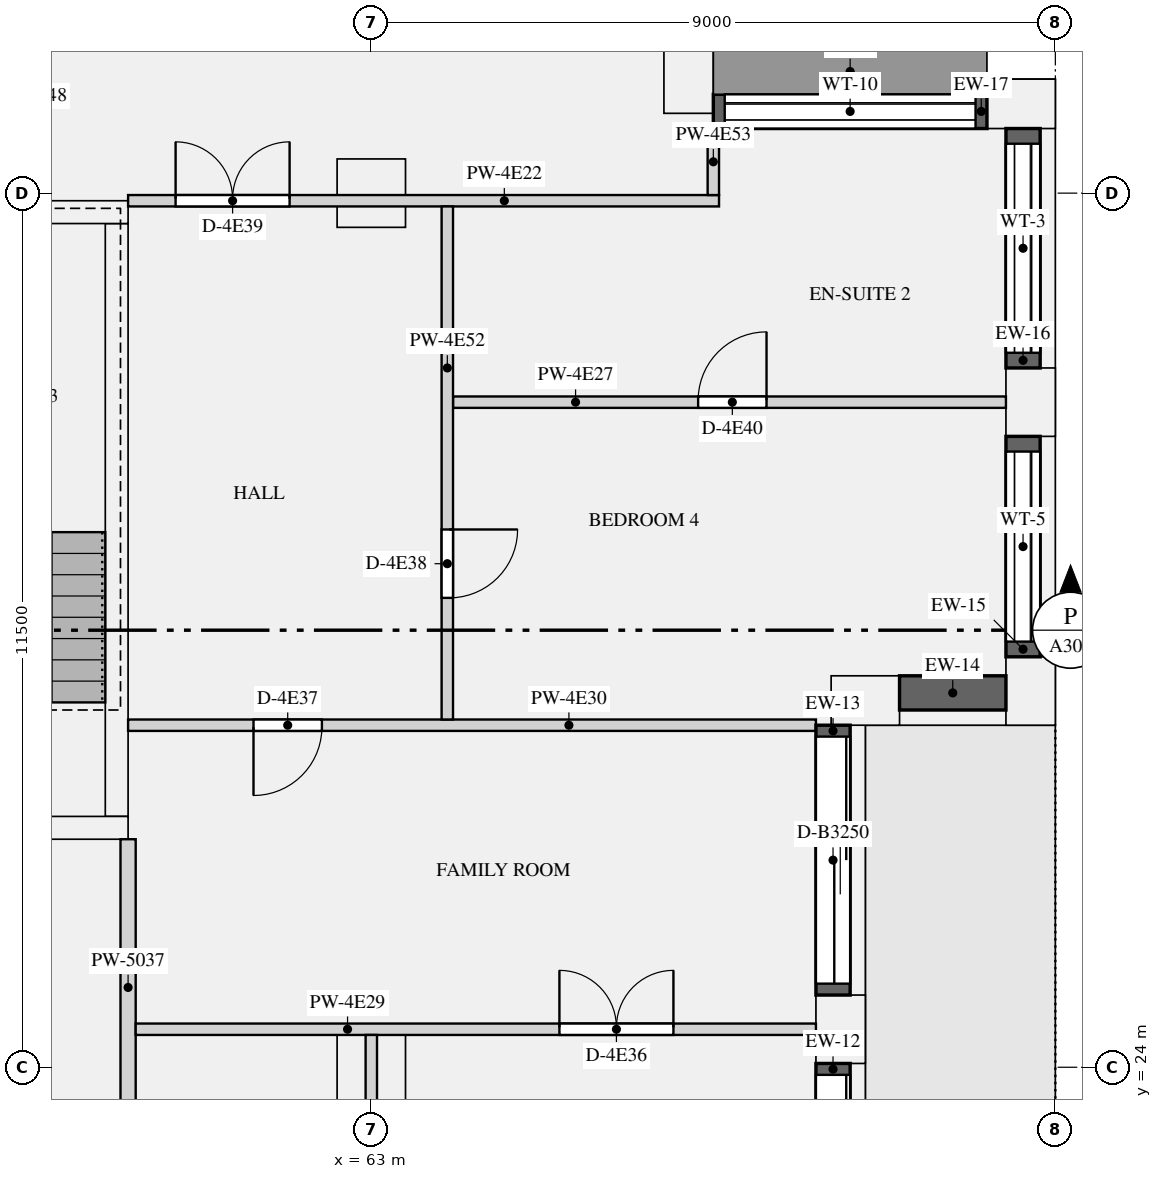
"""IFC4 building model, lengths in metres.
Left out: names, types, materials, properties, quantities, classifications, styles, units other than length and angle.
Written with IfcOpenShell. Run it as: python <this file> out.ifc"""

import sys

from ifc_helpers import new_model, si_unit, direction, frame, frame_2d, origin, origin_2d, place, context, subcontext, project, spatial, rectangle, extrude, element, fill, save


model = new_model("IFC4")
c1 = context("Model", 3, precision=1e-05, world=origin(), true_north=direction((0.0, 1.0)))
c2 = subcontext(c1, "Body", "Model", "MODEL_VIEW")
j1 = project(units=[si_unit("LENGTHUNIT", "METRE"), si_unit("PLANEANGLEUNIT", "RADIAN")], contexts=[c1])
p1 = place(None, origin())
s1 = spatial("IfcSite", under=j1, at=p1, CompositionType="ELEMENT")
p2 = place(p1, origin())
s2 = spatial("IfcBuilding", under=s1, at=p2, CompositionType="ELEMENT")
p3 = place(p2, frame((0.0, 0.0, 232.65)))
s3 = spatial("IfcBuildingStorey", under=s2, at=p3, CompositionType="ELEMENT", Elevation=232.65)
for number, where, z_axis, x_axis in (
    (1, (69.175, 24.5, 0.0), (0.0, 0.0, 1.0), (0.0, 1.0, 0.0)),
    (2, (69.5, 28.825, 0.0), (0.0, 0.0, 1.0), (1.0, 0.0, 0.0)),
    (3, (71.675, 28.95, 0.0), (0.0, 0.0, 1.0), (0.0, 1.0, 0.0)),
    (4, (71.675, 32.75, 0.0), (0.0, 0.0, 1.0), (0.0, 1.0, 0.0)),
    (5, (71.55, 36.675, 0.0), (0.0, 0.0, 1.0), (-1.0, 0.0, 0.0)),
    (6, (67.175, 37.0, 0.0), (0.0, 0.0, 1.0), (0.0, 1.0, 0.0)),
):
    element("IfcColumn", number, at=place(p3, frame(where, z_axis=z_axis, x_axis=x_axis)), inside=s3, PredefinedType="USERDEFINED", context=c2, shape_type="SweptSolid", body=[
        extrude(rectangle(XDim=0.9, YDim=0.65, at=origin_2d()), origin(), (0.0, 0.0, 1.0), 3.15),
    ])
for number, where, z_axis, x_axis in (
    (7, (63.0, 24.0, 0.0), (0.0, 0.0, 1.0), (1.0, 0.0, 0.0)),
    (8, (63.0, 35.5, 0.0), (0.0, 0.0, 1.0), (1.0, 0.0, 0.0)),
):
    element("IfcColumn", number, at=place(p3, frame(where, z_axis=z_axis, x_axis=x_axis)), inside=s3, PredefinedType="COLUMN", context=c2, shape_type="SweptSolid", body=[
        extrude(rectangle(XDim=0.9, YDim=0.9, at=origin_2d()), origin(), (0.0, 0.0, 1.0), 3.15),
    ])
p4 = place(p3, frame((56.2, 27.15, 0.0), z_axis=(0.0, 0.0, 1.0), x_axis=(1.0, 0.0, 0.0)))
e9 = element("IfcWall", 9, at=p4, inside=s3, PredefinedType="SHEAR", context=c2, shape_type="SweptSolid", body=[
    extrude(rectangle(XDim=3.6, YDim=0.3, at=frame_2d((1.8, 0.0))), origin(), (0.0, 0.0, 1.0), 3.15),
])
p5 = place(p4, frame((1.25, 0.0, 0.0)))
e10 = element("IfcOpeningElement", 10, at=p5, cuts=e9, PredefinedType="OPENING", context=c2, shape_type="SweptSolid", body=[
    extrude(rectangle(XDim=1.1, YDim=2.1, at=frame_2d((0.55, 1.05))), frame((0.0, 0.16, 0.0), z_axis=(0.0, -1.0, 0.0), x_axis=(1.0, 0.0, 0.0)), (0.0, 0.0, 1.0), 0.32),
])
p6 = place(p3, frame((56.2, 35.25, 0.0), z_axis=(0.0, 0.0, 1.0), x_axis=(1.0, 0.0, 0.0)))
e11 = element("IfcWall", 11, at=p6, inside=s3, PredefinedType="SHEAR", context=c2, shape_type="SweptSolid", body=[
    extrude(rectangle(XDim=3.6, YDim=0.3, at=frame_2d((1.8, 0.0))), origin(), (0.0, 0.0, 1.0), 3.15),
])
p7 = place(p3, frame((59.65, 27.3, 0.0), z_axis=(0.0, 0.0, 1.0), x_axis=(0.0, 1.0, 0.0)))
e12 = element("IfcWall", 12, at=p7, inside=s3, PredefinedType="SHEAR", context=c2, shape_type="SweptSolid", body=[
    extrude(rectangle(XDim=7.8, YDim=0.3, at=frame_2d((3.9, 0.0))), origin(), (0.0, 0.0, 1.0), 3.15),
])
p8 = place(p3, frame((69.075, 20.95, 0.0), z_axis=(0.0, 0.0, 1.0), x_axis=(0.0, 1.0, 0.0)))
e13 = element("IfcWall", 13, at=p8, inside=s3, PredefinedType="SOLIDWALL", context=c2, shape_type="SweptSolid", body=[
    extrude(rectangle(XDim=3.1, YDim=0.45, at=frame_2d((1.55, 0.0))), origin(), (0.0, 0.0, 1.0), 2.8),
])
p9 = place(p8, frame((0.15, 0.0, 0.0)))
e14 = element("IfcOpeningElement", 14, at=p9, cuts=e13, PredefinedType="OPENING", context=c2, shape_type="SweptSolid", body=[
    extrude(rectangle(XDim=2.8, YDim=2.3, at=frame_2d((1.4, 1.15))), frame((0.0, 0.235, 0.0), z_axis=(0.0, -1.0, 0.0), x_axis=(1.0, 0.0, 0.0)), (0.0, 0.0, 1.0), 0.47),
])
p10 = place(p3, frame((69.075, 24.95, 0.0), z_axis=(0.0, 0.0, 1.0), x_axis=(0.0, 1.0, 0.0)))
e15 = element("IfcWall", 15, at=p10, inside=s3, PredefinedType="SOLIDWALL", context=c2, shape_type="SweptSolid", body=[
    extrude(rectangle(XDim=3.55, YDim=0.45, at=frame_2d((1.775, 0.0))), origin(), (0.0, 0.0, 1.0), 2.8),
])
p11 = place(p10, frame((0.15, 0.0, 0.0)))
e16 = element("IfcOpeningElement", 16, at=p11, cuts=e15, PredefinedType="OPENING", context=c2, shape_type="SweptSolid", body=[
    extrude(rectangle(XDim=3.25, YDim=2.3, at=frame_2d((1.625, 1.15))), frame((0.0, 0.235, 0.0), z_axis=(0.0, -1.0, 0.0), x_axis=(1.0, 0.0, 0.0)), (0.0, 0.0, 1.0), 0.47),
])
p12 = place(p3, frame((69.95, 28.925, 0.9), z_axis=(0.0, 0.0, 1.0), x_axis=(1.0, 0.0, 0.0)))
e17 = element("IfcWall", 17, at=p12, inside=s3, PredefinedType="SOLIDWALL", context=c2, shape_type="SweptSolid", body=[
    extrude(rectangle(XDim=1.4, YDim=0.45, at=frame_2d((0.7, 0.0))), origin(), (0.0, 0.0, 1.0), 1.9),
])
p13 = place(p3, frame((71.575, 29.4, 0.9), z_axis=(0.0, 0.0, 1.0), x_axis=(0.0, 1.0, 0.0)))
e18 = element("IfcWall", 18, at=p13, inside=s3, PredefinedType="SOLIDWALL", context=c2, shape_type="SweptSolid", body=[
    extrude(rectangle(XDim=2.9, YDim=0.45, at=frame_2d((1.45, 0.0))), origin(), (0.0, 0.0, 1.0), 1.9),
])
p14 = place(p13, frame((0.2, 0.0, 0.15)))
e19 = element("IfcOpeningElement", 19, at=p14, cuts=e18, PredefinedType="OPENING", context=c2, shape_type="SweptSolid", body=[
    extrude(rectangle(XDim=2.5, YDim=1.5, at=frame_2d((1.25, 0.75))), frame((0.0, 0.235, 0.0), z_axis=(0.0, -1.0, 0.0), x_axis=(1.0, 0.0, 0.0)), (0.0, 0.0, 1.0), 0.47),
])
p15 = place(p3, frame((71.575, 33.2, 0.9), z_axis=(0.0, 0.0, 1.0), x_axis=(0.0, 1.0, 0.0)))
e20 = element("IfcWall", 20, at=p15, inside=s3, PredefinedType="SOLIDWALL", context=c2, shape_type="SweptSolid", body=[
    extrude(rectangle(XDim=3.15, YDim=0.45, at=frame_2d((1.575, 0.0))), origin(), (0.0, 0.0, 1.0), 1.9),
])
p16 = place(p15, frame((0.2, 0.0, 0.15)))
e21 = element("IfcOpeningElement", 21, at=p16, cuts=e20, PredefinedType="OPENING", context=c2, shape_type="SweptSolid", body=[
    extrude(rectangle(XDim=2.75, YDim=1.5, at=frame_2d((1.375, 0.75))), frame((0.0, 0.235, 0.0), z_axis=(0.0, -1.0, 0.0), x_axis=(1.0, 0.0, 0.0)), (0.0, 0.0, 1.0), 0.47),
])
p17 = place(p3, frame((71.1, 36.575, 0.9), z_axis=(0.0, 0.0, 1.0), x_axis=(-1.0, 0.0, 0.0)))
e22 = element("IfcWall", 22, at=p17, inside=s3, PredefinedType="SOLIDWALL", context=c2, shape_type="SweptSolid", body=[
    extrude(rectangle(XDim=3.6, YDim=0.45, at=frame_2d((1.8, 0.0))), origin(), (0.0, 0.0, 1.0), 1.9),
])
p18 = place(p17, frame((0.15, 0.0, 0.15)))
e23 = element("IfcOpeningElement", 23, at=p18, cuts=e22, PredefinedType="OPENING", context=c2, shape_type="SweptSolid", body=[
    extrude(rectangle(XDim=3.3, YDim=1.5, at=frame_2d((1.65, 0.75))), frame((0.0, 0.235, 0.0), z_axis=(0.0, -1.0, 0.0), x_axis=(1.0, 0.0, 0.0)), (0.0, 0.0, 1.0), 0.47),
])
p19 = place(p3, frame((59.8, 23.1, 0.0), z_axis=(0.0, 0.0, 1.0), x_axis=(0.0, 1.0, 0.0)))
e24 = element("IfcWall", 24, at=p19, inside=s3, PredefinedType="PARTITIONING", context=c2, shape_type="SweptSolid", body=[
    extrude(rectangle(XDim=3.9, YDim=0.2, at=frame_2d((1.95, 0.0))), origin(), (0.0, 0.0, 1.0), 2.8),
])
p20 = place(p3, frame((59.8, 35.4, 0.0), z_axis=(0.0, 0.0, 1.0), x_axis=(1.0, 0.0, 0.0)))
e25 = element("IfcWall", 25, at=p20, inside=s3, PredefinedType="PARTITIONING", context=c2, shape_type="SweptSolid", body=[
    extrude(rectangle(XDim=7.775, YDim=0.15, at=frame_2d((3.887, 0.0))), origin(), (0.0, 0.0, 1.0), 2.8),
])
p21 = place(p20, frame((0.625, 0.0, 0.0)))
e26 = element("IfcOpeningElement", 26, at=p21, cuts=e25, PredefinedType="OPENING", context=c2, shape_type="SweptSolid", body=[
    extrude(rectangle(XDim=1.5, YDim=2.1, at=frame_2d((0.75, 1.05))), frame((0.0, 0.085, 0.0), z_axis=(0.0, -1.0, 0.0), x_axis=(1.0, 0.0, 0.0)), (0.0, 0.0, 1.0), 0.17),
])
p22 = place(p3, frame((64.075, 32.75, 0.0), z_axis=(0.0, 0.0, 1.0), x_axis=(1.0, 0.0, 0.0)))
e27 = element("IfcWall", 27, at=p22, inside=s3, PredefinedType="PARTITIONING", context=c2, shape_type="SweptSolid", body=[
    extrude(rectangle(XDim=7.275, YDim=0.15, at=frame_2d((3.638, 0.0))), origin(), (0.0, 0.0, 1.0), 2.8),
])
p23 = place(p22, frame((3.225, 0.0, 0.0)))
e28 = element("IfcOpeningElement", 28, at=p23, cuts=e27, PredefinedType="OPENING", context=c2, shape_type="SweptSolid", body=[
    extrude(rectangle(XDim=0.9, YDim=2.1, at=frame_2d((0.45, 1.05))), frame((0.0, 0.085, 0.0), z_axis=(0.0, -1.0, 0.0), x_axis=(1.0, 0.0, 0.0)), (0.0, 0.0, 1.0), 0.17),
])
p24 = place(p3, frame((59.9, 24.5, 0.0), z_axis=(0.0, 0.0, 1.0), x_axis=(1.0, 0.0, 0.0)))
e29 = element("IfcWall", 29, at=p24, inside=s3, PredefinedType="PARTITIONING", context=c2, shape_type="SweptSolid", body=[
    extrude(rectangle(XDim=8.95, YDim=0.15, at=frame_2d((4.475, 0.0))), origin(), (0.0, 0.0, 1.0), 2.8),
])
p25 = place(p24, frame((5.575, 0.0, 0.0)))
e30 = element("IfcOpeningElement", 30, at=p25, cuts=e29, PredefinedType="OPENING", context=c2, shape_type="SweptSolid", body=[
    extrude(rectangle(XDim=1.5, YDim=2.1, at=frame_2d((0.75, 1.05))), frame((0.0, 0.085, 0.0), z_axis=(0.0, -1.0, 0.0), x_axis=(1.0, 0.0, 0.0)), (0.0, 0.0, 1.0), 0.17),
])
p26 = place(p3, frame((59.8, 28.5, 0.0), z_axis=(0.0, 0.0, 1.0), x_axis=(1.0, 0.0, 0.0)))
e31 = element("IfcWall", 31, at=p26, inside=s3, PredefinedType="PARTITIONING", context=c2, shape_type="SweptSolid", body=[
    extrude(rectangle(XDim=9.05, YDim=0.15, at=frame_2d((4.525, 0.0))), origin(), (0.0, 0.0, 1.0), 2.8),
])
p27 = place(p26, frame((1.65, 0.0, 0.0)))
e32 = element("IfcOpeningElement", 32, at=p27, cuts=e31, PredefinedType="OPENING", context=c2, shape_type="SweptSolid", body=[
    extrude(rectangle(XDim=0.9, YDim=2.1, at=frame_2d((0.45, 1.05))), frame((0.0, 0.085, 0.0), z_axis=(0.0, -1.0, 0.0), x_axis=(1.0, 0.0, 0.0)), (0.0, 0.0, 1.0), 0.17),
])
p28 = place(p3, frame((63.0, 12.575, 0.0), z_axis=(0.0, 0.0, 1.0), x_axis=(0.0, 1.0, 0.0)))
e33 = element("IfcWall", 33, at=p28, inside=s3, PredefinedType="PARTITIONING", context=c2, shape_type="SweptSolid", body=[
    extrude(rectangle(XDim=11.85, YDim=0.15, at=frame_2d((5.925, 0.0))), origin(), (0.0, 0.0, 1.0), 2.8),
])
p29 = place(p28, frame((8.25, 0.0, 0.0)))
e34 = element("IfcOpeningElement", 34, at=p29, cuts=e33, PredefinedType="OPENING", context=c2, shape_type="SweptSolid", body=[
    extrude(rectangle(XDim=0.9, YDim=2.1, at=frame_2d((0.45, 1.05))), frame((0.0, 0.085, 0.0), z_axis=(0.0, -1.0, 0.0), x_axis=(1.0, 0.0, 0.0)), (0.0, 0.0, 1.0), 0.17),
])
p30 = place(p3, frame((64.0, 28.575, 0.0), z_axis=(0.0, 0.0, 1.0), x_axis=(0.0, 1.0, 0.0)))
e35 = element("IfcWall", 35, at=p30, inside=s3, PredefinedType="PARTITIONING", context=c2, shape_type="SweptSolid", body=[
    extrude(rectangle(XDim=6.75, YDim=0.15, at=frame_2d((3.375, 0.0))), origin(), (0.0, 0.0, 1.0), 2.8),
])
p31 = place(p30, frame((1.6, 0.0, 0.0)))
e36 = element("IfcOpeningElement", 36, at=p31, cuts=e35, PredefinedType="OPENING", context=c2, shape_type="SweptSolid", body=[
    extrude(rectangle(XDim=0.9, YDim=2.1, at=frame_2d((0.45, 1.05))), frame((0.0, 0.085, 0.0), z_axis=(0.0, -1.0, 0.0), x_axis=(1.0, 0.0, 0.0)), (0.0, 0.0, 1.0), 0.17),
])
p32 = place(p3, frame((67.5, 35.475, 0.0), z_axis=(0.0, 0.0, 1.0), x_axis=(0.0, 1.0, 0.0)))
e37 = element("IfcWall", 37, at=p32, inside=s3, PredefinedType="PARTITIONING", context=c2, shape_type="SweptSolid", body=[
    extrude(rectangle(XDim=0.875, YDim=0.15, at=frame_2d((0.438, 0.0))), origin(), (0.0, 0.0, 1.0), 2.8),
])
p33 = place(p9, origin())
e38 = element("IfcDoor", 38, at=p33, inside=s3, OperationType="SLIDING_TO_LEFT", PredefinedType="DOOR", context=c2, shape_type="SweptSolid", body=[
    extrude(rectangle(XDim=2.8, YDim=2.3, at=frame_2d((1.4, 1.15))), frame((0.0, -0.07, 0.0), z_axis=(0.0, -1.0, 0.0), x_axis=(1.0, 0.0, 0.0)), (0.0, 0.0, 1.0), 0.05),
])
fill(e14, e38)
p34 = place(p11, origin())
e39 = element("IfcDoor", 39, at=p34, inside=s3, OperationType="SLIDING_TO_LEFT", PredefinedType="DOOR", context=c2, shape_type="SweptSolid", body=[
    extrude(rectangle(XDim=3.25, YDim=2.3, at=frame_2d((1.625, 1.15))), frame((0.0, -0.07, 0.0), z_axis=(0.0, -1.0, 0.0), x_axis=(1.0, 0.0, 0.0)), (0.0, 0.0, 1.0), 0.05),
])
fill(e16, e39)
p35 = place(p14, origin())
e40 = element("IfcWindow", 40, at=p35, inside=s3, PartitioningType="SINGLE_PANEL", PredefinedType="WINDOW", context=c2, shape_type="SweptSolid", body=[
    extrude(rectangle(XDim=2.5, YDim=1.5, at=frame_2d((1.25, 0.75))), frame((0.0, -0.065, 0.0), z_axis=(0.0, -1.0, 0.0), x_axis=(1.0, 0.0, 0.0)), (0.0, 0.0, 1.0), 0.06),
])
fill(e19, e40)
p36 = place(p16, origin())
e41 = element("IfcWindow", 41, at=p36, inside=s3, PartitioningType="SINGLE_PANEL", PredefinedType="WINDOW", context=c2, shape_type="SweptSolid", body=[
    extrude(rectangle(XDim=2.75, YDim=1.5, at=frame_2d((1.375, 0.75))), frame((0.0, -0.065, 0.0), z_axis=(0.0, -1.0, 0.0), x_axis=(1.0, 0.0, 0.0)), (0.0, 0.0, 1.0), 0.06),
])
fill(e21, e41)
p37 = place(p18, origin())
e42 = element("IfcWindow", 42, at=p37, inside=s3, PartitioningType="SINGLE_PANEL", PredefinedType="WINDOW", context=c2, shape_type="SweptSolid", body=[
    extrude(rectangle(XDim=3.3, YDim=1.5, at=frame_2d((1.65, 0.75))), frame((0.0, -0.065, 0.0), z_axis=(0.0, -1.0, 0.0), x_axis=(1.0, 0.0, 0.0)), (0.0, 0.0, 1.0), 0.06),
])
fill(e23, e42)
p38 = place(p25, origin())
e43 = element("IfcDoor", 43, at=p38, inside=s3, OperationType="DOUBLE_DOOR_SINGLE_SWING", PredefinedType="DOOR", context=c2, shape_type="SweptSolid", body=[
    extrude(rectangle(XDim=1.5, YDim=2.1, at=frame_2d((0.75, 1.05))), frame((0.0, 0.025, 0.0), z_axis=(0.0, -1.0, 0.0), x_axis=(1.0, 0.0, 0.0)), (0.0, 0.0, 1.0), 0.05),
])
fill(e30, e43)
p39 = place(p27, frame((0.9, 0.0, 0.0), z_axis=(0.0, 0.0, 1.0), x_axis=(-1.0, 0.0, 0.0)))
e44 = element("IfcDoor", 44, at=p39, inside=s3, OperationType="SINGLE_SWING_RIGHT", PredefinedType="DOOR", context=c2, shape_type="SweptSolid", body=[
    extrude(rectangle(XDim=0.9, YDim=2.1, at=frame_2d((0.45, 1.05))), frame((0.0, 0.025, 0.0), z_axis=(0.0, -1.0, 0.0), x_axis=(1.0, 0.0, 0.0)), (0.0, 0.0, 1.0), 0.05),
])
fill(e32, e44)
p40 = place(p31, frame((0.9, 0.0, 0.0), z_axis=(0.0, 0.0, 1.0), x_axis=(-1.0, 0.0, 0.0)))
e45 = element("IfcDoor", 45, at=p40, inside=s3, OperationType="SINGLE_SWING_LEFT", PredefinedType="DOOR", context=c2, shape_type="SweptSolid", body=[
    extrude(rectangle(XDim=0.9, YDim=2.1, at=frame_2d((0.45, 1.05))), frame((0.0, 0.025, 0.0), z_axis=(0.0, -1.0, 0.0), x_axis=(1.0, 0.0, 0.0)), (0.0, 0.0, 1.0), 0.05),
])
fill(e36, e45)
p41 = place(p21, origin())
e46 = element("IfcDoor", 46, at=p41, inside=s3, OperationType="DOUBLE_DOOR_SINGLE_SWING", PredefinedType="DOOR", context=c2, shape_type="SweptSolid", body=[
    extrude(rectangle(XDim=1.5, YDim=2.1, at=frame_2d((0.75, 1.05))), frame((0.0, 0.025, 0.0), z_axis=(0.0, -1.0, 0.0), x_axis=(1.0, 0.0, 0.0)), (0.0, 0.0, 1.0), 0.05),
])
fill(e26, e46)
p42 = place(p23, origin())
e47 = element("IfcDoor", 47, at=p42, inside=s3, OperationType="SINGLE_SWING_RIGHT", PredefinedType="DOOR", context=c2, shape_type="SweptSolid", body=[
    extrude(rectangle(XDim=0.9, YDim=2.1, at=frame_2d((0.45, 1.05))), frame((0.0, 0.025, 0.0), z_axis=(0.0, -1.0, 0.0), x_axis=(1.0, 0.0, 0.0)), (0.0, 0.0, 1.0), 0.05),
])
fill(e28, e47)
save(model, sys.argv[1])
